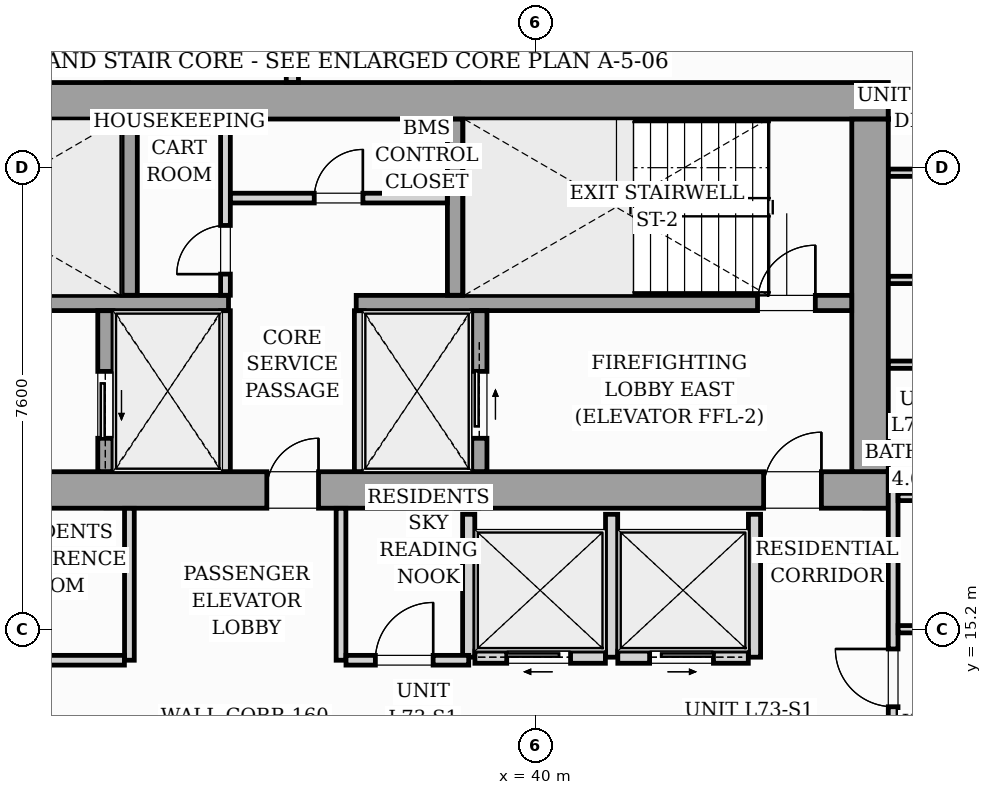
"""IFC4 building model, lengths in metres.
Left out: names, types, materials, properties, quantities, classifications, styles, units other than length and angle.
Written with IfcOpenShell. Run it as: python <this file> out.ifc"""

import sys

from ifc_helpers import new_model, si_unit, direction, frame, frame_2d, origin, origin_2d, place, context, subcontext, project, spatial, rectangle, i_section, extrude, source, transform, mapped, element, fill, save


model = new_model("IFC4")
c1 = context("Model", 3, precision=1e-05, world=origin(), true_north=direction((0.0, 1.0)))
c2 = subcontext(c1, "Body", "Model", "MODEL_VIEW")
j1 = project(units=[si_unit("LENGTHUNIT", "METRE"), si_unit("PLANEANGLEUNIT", "RADIAN")], contexts=[c1])
p1 = place(None, origin())
s1 = spatial("IfcSite", under=j1, at=p1, CompositionType="ELEMENT")
p2 = place(p1, origin())
s2 = spatial("IfcBuilding", under=s1, at=p2, CompositionType="ELEMENT")
p3 = place(p2, frame((0.0, 0.0, 252.9)))
s3 = spatial("IfcBuildingStorey", under=s2, at=p3, CompositionType="ELEMENT", Elevation=252.9)
m1 = source(origin(), c2, "Body", "SweptSolid", [
    extrude(i_section(OverallWidth=0.409, OverallDepth=0.425, WebThickness=0.033, FlangeThickness=0.052, FilletRadius=0.018, at=origin_2d()), origin(), (0.0, 0.0, 1.0), 3.296),
])
for number, where, z_axis, x_axis in (
    (1, (33.12, 17.4, 0.002), (0.0, 0.0, 1.0), (1.0, 0.0, 0.0)),
    (2, (38.88, 17.4, 0.002), (0.0, 0.0, 1.0), (1.0, 0.0, 0.0)),
    (3, (45.6, 17.4, 0.002), (0.0, 0.0, 1.0), (1.0, 0.0, 0.0)),
    (4, (33.12, 24.0, 0.002), (0.0, 0.0, 1.0), (1.0, 0.0, 0.0)),
    (5, (38.88, 24.0, 0.002), (0.0, 0.0, 1.0), (1.0, 0.0, 0.0)),
    (6, (45.6, 24.0, 0.002), (0.0, 0.0, 1.0), (1.0, 0.0, 0.0)),
):
    element("IfcColumn", number, at=place(p3, frame(where, z_axis=z_axis, x_axis=x_axis)), inside=s3, PredefinedType="PILASTER", context=c2, shape_type="MappedRepresentation", body=[
        mapped(m1, transform((0.0, 0.0, 0.0), scale=1.0)),
    ])
p4 = place(p3, frame((26.2, 17.5, 0.0), z_axis=(0.0, 0.0, 1.0), x_axis=(1.0, 0.0, 0.0)))
e7 = element("IfcWall", 7, at=p4, inside=s3, PredefinedType="SHEAR", context=c2, shape_type="SweptSolid", body=[
    extrude(rectangle(XDim=19.6, YDim=0.6, at=frame_2d((9.8, 0.0))), origin(), (0.0, 0.0, 1.0), 3.3),
])
p5 = place(p4, frame((0.95, 0.0, 0.0)))
e8 = element("IfcOpeningElement", 8, at=p5, cuts=e7, PredefinedType="OPENING", context=c2, shape_type="SweptSolid", body=[
    extrude(rectangle(XDim=0.95, YDim=2.06, at=frame_2d((0.475, 1.03))), frame((0.0, 0.31, 0.0), z_axis=(0.0, -1.0, 0.0), x_axis=(1.0, 0.0, 0.0)), (0.0, 0.0, 1.0), 0.62),
])
p6 = place(p4, frame((9.38, 0.0, 0.0)))
e9 = element("IfcOpeningElement", 9, at=p6, cuts=e7, PredefinedType="OPENING", context=c2, shape_type="SweptSolid", body=[
    extrude(rectangle(XDim=0.85, YDim=2.0, at=frame_2d((0.425, 1.0))), frame((0.0, 0.31, 0.0), z_axis=(0.0, -1.0, 0.0), x_axis=(1.0, 0.0, 0.0)), (0.0, 0.0, 1.0), 0.62),
])
p7 = place(p4, frame((17.55, 0.0, 0.0)))
e10 = element("IfcOpeningElement", 10, at=p7, cuts=e7, PredefinedType="OPENING", context=c2, shape_type="SweptSolid", body=[
    extrude(rectangle(XDim=0.95, YDim=2.06, at=frame_2d((0.475, 1.03))), frame((0.0, 0.31, 0.0), z_axis=(0.0, -1.0, 0.0), x_axis=(1.0, 0.0, 0.0)), (0.0, 0.0, 1.0), 0.62),
])
p8 = place(p3, frame((26.2, 23.9, 0.0), z_axis=(0.0, 0.0, 1.0), x_axis=(1.0, 0.0, 0.0)))
e11 = element("IfcWall", 11, at=p8, inside=s3, PredefinedType="SHEAR", context=c2, shape_type="SweptSolid", body=[
    extrude(rectangle(XDim=19.6, YDim=0.6, at=frame_2d((9.8, 0.0))), origin(), (0.0, 0.0, 1.0), 3.3),
])
p9 = place(p3, frame((45.5, 17.802, 0.0), z_axis=(0.0, 0.0, 1.0), x_axis=(0.0, 1.0, 0.0)))
e12 = element("IfcWall", 12, at=p9, inside=s3, PredefinedType="SHEAR", context=c2, shape_type="SweptSolid", body=[
    extrude(rectangle(XDim=5.796, YDim=0.6, at=frame_2d((2.898, 0.0))), origin(), (0.0, 0.0, 1.0), 3.3),
])
p10 = place(p3, frame((26.802, 20.575, 0.0), z_axis=(0.0, 0.0, 1.0), x_axis=(1.0, 0.0, 0.0)))
e13 = element("IfcWall", 13, at=p10, inside=s3, PredefinedType="SOLIDWALL", context=c2, shape_type="SweptSolid", body=[
    extrude(rectangle(XDim=8.148, YDim=0.25, at=frame_2d((4.074, 0.0))), origin(), (0.0, 0.0, 1.0), 3.3),
])
p11 = place(p10, frame((0.298, 0.0, 0.0)))
e14 = element("IfcOpeningElement", 14, at=p11, cuts=e13, PredefinedType="OPENING", context=c2, shape_type="SweptSolid", body=[
    extrude(rectangle(XDim=0.95, YDim=2.06, at=frame_2d((0.475, 1.03))), frame((0.0, 0.135, 0.0), z_axis=(0.0, -1.0, 0.0), x_axis=(1.0, 0.0, 0.0)), (0.0, 0.0, 1.0), 0.27),
])
p12 = place(p3, frame((37.05, 20.575, 0.0), z_axis=(0.0, 0.0, 1.0), x_axis=(1.0, 0.0, 0.0)))
e15 = element("IfcWall", 15, at=p12, inside=s3, PredefinedType="SOLIDWALL", context=c2, shape_type="SweptSolid", body=[
    extrude(rectangle(XDim=8.148, YDim=0.25, at=frame_2d((4.074, 0.0))), origin(), (0.0, 0.0, 1.0), 3.3),
])
p13 = place(p12, frame((6.6, 0.0, 0.0)))
e16 = element("IfcOpeningElement", 16, at=p13, cuts=e15, PredefinedType="OPENING", context=c2, shape_type="SweptSolid", body=[
    extrude(rectangle(XDim=0.95, YDim=2.06, at=frame_2d((0.475, 1.03))), frame((0.0, 0.135, 0.0), z_axis=(0.0, -1.0, 0.0), x_axis=(1.0, 0.0, 0.0)), (0.0, 0.0, 1.0), 0.27),
])
for number, where, z_axis, x_axis in (
    (17, (33.325, 20.702, 0.0), (0.0, 0.0, 1.0), (0.0, 1.0, 0.0)),
    (18, (38.675, 20.702, 0.0), (0.0, 0.0, 1.0), (0.0, 1.0, 0.0)),
):
    element("IfcWall", number, at=place(p3, frame(where, z_axis=z_axis, x_axis=x_axis)), inside=s3, PredefinedType="SOLIDWALL", context=c2, shape_type="SweptSolid", body=[
        extrude(rectangle(XDim=2.896, YDim=0.25, at=frame_2d((1.448, 0.0))), origin(), (0.0, 0.0, 1.0), 3.3),
    ])
p14 = place(p3, frame((32.925, 17.802, 0.0), z_axis=(0.0, 0.0, 1.0), x_axis=(0.0, 1.0, 0.0)))
e19 = element("IfcWall", 19, at=p14, inside=s3, PredefinedType="SOLIDWALL", context=c2, shape_type="SweptSolid", body=[
    extrude(rectangle(XDim=2.646, YDim=0.25, at=frame_2d((1.323, 0.0))), origin(), (0.0, 0.0, 1.0), 3.3),
])
p15 = place(p14, frame((0.548, 0.0, 0.0)))
e20 = element("IfcOpeningElement", 20, at=p15, cuts=e19, PredefinedType="OPENING", context=c2, shape_type="SweptSolid", body=[
    extrude(rectangle(XDim=1.1, YDim=2.08, at=frame_2d((0.55, 1.04))), frame((0.0, 0.135, 0.0), z_axis=(0.0, -1.0, 0.0), x_axis=(1.0, 0.0, 0.0)), (0.0, 0.0, 1.0), 0.27),
])
for number, where, z_axis, x_axis in (
    (21, (34.9, 17.802, 0.0), (0.0, 0.0, 1.0), (0.0, 1.0, 0.0)),
    (22, (37.1, 17.802, 0.0), (0.0, 0.0, 1.0), (0.0, 1.0, 0.0)),
):
    element("IfcWall", number, at=place(p3, frame(where, z_axis=z_axis, x_axis=x_axis)), inside=s3, PredefinedType="PARTITIONING", context=c2, shape_type="SweptSolid", body=[
        extrude(rectangle(XDim=2.646, YDim=0.16, at=frame_2d((1.323, 0.0))), origin(), (0.0, 0.0, 1.0), 3.04),
    ])
p16 = place(p3, frame((39.075, 17.802, 0.0), z_axis=(0.0, 0.0, 1.0), x_axis=(0.0, 1.0, 0.0)))
e23 = element("IfcWall", 23, at=p16, inside=s3, PredefinedType="SOLIDWALL", context=c2, shape_type="SweptSolid", body=[
    extrude(rectangle(XDim=2.646, YDim=0.25, at=frame_2d((1.323, 0.0))), origin(), (0.0, 0.0, 1.0), 3.3),
])
p17 = place(p16, frame((0.548, 0.0, 0.0)))
e24 = element("IfcOpeningElement", 24, at=p17, cuts=e23, PredefinedType="OPENING", context=c2, shape_type="SweptSolid", body=[
    extrude(rectangle(XDim=1.1, YDim=2.08, at=frame_2d((0.55, 1.04))), frame((0.0, 0.135, 0.0), z_axis=(0.0, -1.0, 0.0), x_axis=(1.0, 0.0, 0.0)), (0.0, 0.0, 1.0), 0.27),
])
p18 = place(p3, frame((34.9, 20.702, 0.0), z_axis=(0.0, 0.0, 1.0), x_axis=(0.0, 1.0, 0.0)))
e25 = element("IfcWall", 25, at=p18, inside=s3, PredefinedType="PARTITIONING", context=c2, shape_type="SweptSolid", body=[
    extrude(rectangle(XDim=2.896, YDim=0.16, at=frame_2d((1.448, 0.0))), origin(), (0.0, 0.0, 1.0), 3.04),
])
p19 = place(p18, frame((0.348, 0.0, 0.0)))
e26 = element("IfcOpeningElement", 26, at=p19, cuts=e25, PredefinedType="OPENING", context=c2, shape_type="SweptSolid", body=[
    extrude(rectangle(XDim=0.8, YDim=2.05, at=frame_2d((0.4, 1.025))), frame((0.0, 0.09, 0.0), z_axis=(0.0, -1.0, 0.0), x_axis=(1.0, 0.0, 0.0)), (0.0, 0.0, 1.0), 0.18),
])
p20 = place(p3, frame((34.982, 22.3, 0.0), z_axis=(0.0, 0.0, 1.0), x_axis=(1.0, 0.0, 0.0)))
e27 = element("IfcWall", 27, at=p20, inside=s3, PredefinedType="PARTITIONING", context=c2, shape_type="SweptSolid", body=[
    extrude(rectangle(XDim=3.566, YDim=0.16, at=frame_2d((1.783, 0.0))), origin(), (0.0, 0.0, 1.0), 3.04),
])
p21 = place(p20, frame((1.378, 0.0, 0.0)))
e28 = element("IfcOpeningElement", 28, at=p21, cuts=e27, PredefinedType="OPENING", context=c2, shape_type="SweptSolid", body=[
    extrude(rectangle(XDim=0.8, YDim=2.05, at=frame_2d((0.4, 1.025))), frame((0.0, 0.09, 0.0), z_axis=(0.0, -1.0, 0.0), x_axis=(1.0, 0.0, 0.0)), (0.0, 0.0, 1.0), 0.18),
])
for number, where, z_axis, x_axis in (
    (29, (38.9, 14.75, 0.0), (0.0, 0.0, 1.0), (0.0, 1.0, 0.0)),
    (30, (41.25, 14.75, 0.0), (0.0, 0.0, 1.0), (0.0, 1.0, 0.0)),
    (31, (43.6, 14.75, 0.0), (0.0, 0.0, 1.0), (0.0, 1.0, 0.0)),
):
    element("IfcWall", number, at=place(p3, frame(where, z_axis=z_axis, x_axis=x_axis)), inside=s3, PredefinedType="PARTITIONING", context=c2, shape_type="SweptSolid", body=[
        extrude(rectangle(XDim=2.35, YDim=0.2, at=frame_2d((1.175, 0.0))), origin(), (0.0, 0.0, 1.0), 3.04),
    ])
p22 = place(p3, frame((39.002, 14.75, 0.0), z_axis=(0.0, 0.0, 1.0), x_axis=(1.0, 0.0, 0.0)))
e32 = element("IfcWall", 32, at=p22, inside=s3, PredefinedType="PARTITIONING", context=c2, shape_type="SweptSolid", body=[
    extrude(rectangle(XDim=2.146, YDim=0.2, at=frame_2d((1.073, 0.0))), origin(), (0.0, 0.0, 1.0), 3.04),
])
p23 = place(p22, frame((0.523, 0.0, 0.0)))
e33 = element("IfcOpeningElement", 33, at=p23, cuts=e32, PredefinedType="OPENING", context=c2, shape_type="SweptSolid", body=[
    extrude(rectangle(XDim=1.05, YDim=2.08, at=frame_2d((0.525, 1.04))), frame((0.0, 0.11, 0.0), z_axis=(0.0, -1.0, 0.0), x_axis=(1.0, 0.0, 0.0)), (0.0, 0.0, 1.0), 0.22),
])
p24 = place(p3, frame((41.352, 14.75, 0.0), z_axis=(0.0, 0.0, 1.0), x_axis=(1.0, 0.0, 0.0)))
e34 = element("IfcWall", 34, at=p24, inside=s3, PredefinedType="PARTITIONING", context=c2, shape_type="SweptSolid", body=[
    extrude(rectangle(XDim=2.146, YDim=0.2, at=frame_2d((1.073, 0.0))), origin(), (0.0, 0.0, 1.0), 3.04),
])
p25 = place(p24, frame((0.523, 0.0, 0.0)))
e35 = element("IfcOpeningElement", 35, at=p25, cuts=e34, PredefinedType="OPENING", context=c2, shape_type="SweptSolid", body=[
    extrude(rectangle(XDim=1.05, YDim=2.08, at=frame_2d((0.525, 1.04))), frame((0.0, 0.11, 0.0), z_axis=(0.0, -1.0, 0.0), x_axis=(1.0, 0.0, 0.0)), (0.0, 0.0, 1.0), 0.22),
])
p26 = place(p3, frame((45.88, 13.442, 0.0), z_axis=(0.0, 0.0, 1.0), x_axis=(0.0, 1.0, 0.0)))
e36 = element("IfcWall", 36, at=p26, inside=s3, PredefinedType="PARTITIONING", context=c2, shape_type="SweptSolid", body=[
    extrude(rectangle(XDim=4.36, YDim=0.16, at=frame_2d((2.18, 0.0))), origin(), (0.0, 0.0, 1.0), 3.04),
])
p27 = place(p26, frame((0.493, 0.0, 0.0)))
e37 = element("IfcOpeningElement", 37, at=p27, cuts=e36, PredefinedType="OPENING", context=c2, shape_type="SweptSolid", body=[
    extrude(rectangle(XDim=0.95, YDim=2.06, at=frame_2d((0.475, 1.03))), frame((0.0, 0.09, 0.0), z_axis=(0.0, -1.0, 0.0), x_axis=(1.0, 0.0, 0.0)), (0.0, 0.0, 1.0), 0.18),
])
p28 = place(p3, frame((45.88, 23.598, 0.0), z_axis=(0.0, 0.0, 1.0), x_axis=(0.0, 1.0, 0.0)))
e38 = element("IfcWall", 38, at=p28, inside=s3, PredefinedType="PARTITIONING", context=c2, shape_type="SweptSolid", body=[
    extrude(rectangle(XDim=0.452, YDim=0.16, at=frame_2d((0.226, 0.0))), origin(), (0.0, 0.0, 1.0), 3.04),
])
p29 = place(p3, frame((36.0, 24.202, 0.0), z_axis=(0.0, 0.0, 1.0), x_axis=(0.0, 1.0, 0.0)))
e39 = element("IfcWall", 39, at=p29, inside=s3, PredefinedType="PARTITIONING", context=c2, shape_type="SweptSolid", body=[
    extrude(rectangle(XDim=2.363, YDim=0.2, at=frame_2d((1.182, 0.0))), origin(), (0.0, 0.0, 1.0), 3.04),
])
p30 = place(p3, frame((45.962, 17.385, 0.0), z_axis=(0.0, 0.0, 1.0), x_axis=(1.0, 0.0, 0.0)))
e40 = element("IfcWall", 40, at=p30, inside=s3, PredefinedType="PARTITIONING", context=c2, shape_type="SweptSolid", body=[
    extrude(rectangle(XDim=2.256, YDim=0.12, at=frame_2d((1.128, 0.0))), origin(), (0.0, 0.0, 1.0), 2.382),
])
p31 = place(p3, frame((45.962, 15.21, 0.0), z_axis=(0.0, 0.0, 1.0), x_axis=(1.0, 0.0, 0.0)))
e41 = element("IfcWall", 41, at=p31, inside=s3, PredefinedType="PARTITIONING", context=c2, shape_type="SweptSolid", body=[
    extrude(rectangle(XDim=2.256, YDim=0.12, at=frame_2d((1.128, 0.0))), origin(), (0.0, 0.0, 1.0), 3.04),
])
p32 = place(p3, frame((45.802, 19.56, 0.0), z_axis=(0.0, 0.0, 1.0), x_axis=(1.0, 0.0, 0.0)))
e42 = element("IfcWall", 42, at=p32, inside=s3, PredefinedType="PARTITIONING", context=c2, shape_type="SweptSolid", body=[
    extrude(rectangle(XDim=2.416, YDim=0.12, at=frame_2d((1.208, 0.0))), origin(), (0.0, 0.0, 1.0), 3.04),
])
p33 = place(p3, frame((45.802, 22.717, 0.0), z_axis=(0.0, 0.0, 1.0), x_axis=(1.0, 0.0, 0.0)))
e43 = element("IfcWall", 43, at=p33, inside=s3, PredefinedType="PARTITIONING", context=c2, shape_type="SweptSolid", body=[
    extrude(rectangle(XDim=9.406, YDim=0.12, at=frame_2d((4.703, 0.0))), origin(), (0.0, 0.0, 1.0), 3.04),
])
p34 = place(p33, frame((4.397, 0.0, 0.0)))
e44 = element("IfcOpeningElement", 44, at=p34, cuts=e43, PredefinedType="OPENING", context=c2, shape_type="SweptSolid", body=[
    extrude(rectangle(XDim=0.85, YDim=2.05, at=frame_2d((0.425, 1.025))), frame((0.0, 0.07, 0.0), z_axis=(0.0, -1.0, 0.0), x_axis=(1.0, 0.0, 0.0)), (0.0, 0.0, 1.0), 0.14),
])
p35 = place(p3, frame((45.802, 20.954, 0.0), z_axis=(0.0, 0.0, 1.0), x_axis=(1.0, 0.0, 0.0)))
e45 = element("IfcWall", 45, at=p35, inside=s3, PredefinedType="PARTITIONING", context=c2, shape_type="SweptSolid", body=[
    extrude(rectangle(XDim=10.683, YDim=0.12, at=frame_2d((5.342, 0.0))), origin(), (0.0, 0.0, 1.0), 3.04),
])
p36 = place(p35, frame((5.062, 0.0, 0.0)))
e46 = element("IfcOpeningElement", 46, at=p36, cuts=e45, PredefinedType="OPENING", context=c2, shape_type="SweptSolid", body=[
    extrude(rectangle(XDim=0.85, YDim=2.05, at=frame_2d((0.425, 1.025))), frame((0.0, 0.07, 0.0), z_axis=(0.0, -1.0, 0.0), x_axis=(1.0, 0.0, 0.0)), (0.0, 0.0, 1.0), 0.14),
])
p37 = place(p3, frame((33.32, 14.7, 0.0), z_axis=(0.0, 0.0, 1.0), x_axis=(0.0, 1.0, 0.0)))
e47 = element("IfcWall", 47, at=p37, inside=s3, PredefinedType="PARTITIONING", context=c2, shape_type="SweptSolid", body=[
    extrude(rectangle(XDim=2.498, YDim=0.16, at=frame_2d((1.249, 0.0))), origin(), (0.0, 0.0, 1.0), 3.04),
])
p38 = place(p3, frame((28.442, 14.7, 0.0), z_axis=(0.0, 0.0, 1.0), x_axis=(1.0, 0.0, 0.0)))
e48 = element("IfcWall", 48, at=p38, inside=s3, PredefinedType="PARTITIONING", context=c2, shape_type="SweptSolid", body=[
    extrude(rectangle(XDim=4.796, YDim=0.16, at=frame_2d((2.398, 0.0))), origin(), (0.0, 0.0, 1.0), 2.605),
])
p39 = place(p38, frame((1.923, 0.0, 0.0)))
e49 = element("IfcOpeningElement", 49, at=p39, cuts=e48, PredefinedType="OPENING", context=c2, shape_type="SweptSolid", body=[
    extrude(rectangle(XDim=0.95, YDim=2.06, at=frame_2d((0.475, 1.03))), frame((0.0, 0.09, 0.0), z_axis=(0.0, -1.0, 0.0), x_axis=(1.0, 0.0, 0.0)), (0.0, 0.0, 1.0), 0.18),
])
p40 = place(p3, frame((36.8, 14.7, 0.0), z_axis=(0.0, 0.0, 1.0), x_axis=(0.0, 1.0, 0.0)))
e50 = element("IfcWall", 50, at=p40, inside=s3, PredefinedType="PARTITIONING", context=c2, shape_type="SweptSolid", body=[
    extrude(rectangle(XDim=2.498, YDim=0.16, at=frame_2d((1.249, 0.0))), origin(), (0.0, 0.0, 1.0), 3.04),
])
p41 = place(p3, frame((36.882, 14.7, 0.0), z_axis=(0.0, 0.0, 1.0), x_axis=(1.0, 0.0, 0.0)))
e51 = element("IfcWall", 51, at=p41, inside=s3, PredefinedType="PARTITIONING", context=c2, shape_type="SweptSolid", body=[
    extrude(rectangle(XDim=2.018, YDim=0.16, at=frame_2d((1.009, 0.0))), origin(), (0.0, 0.0, 1.0), 3.04),
])
p42 = place(p41, frame((0.483, 0.0, 0.0)))
e52 = element("IfcOpeningElement", 52, at=p42, cuts=e51, PredefinedType="OPENING", context=c2, shape_type="SweptSolid", body=[
    extrude(rectangle(XDim=0.95, YDim=2.06, at=frame_2d((0.475, 1.03))), frame((0.0, 0.09, 0.0), z_axis=(0.0, -1.0, 0.0), x_axis=(1.0, 0.0, 0.0)), (0.0, 0.0, 1.0), 0.18),
])
m2 = source(origin(), c2, "Body", "SweptSolid", [
    extrude(rectangle(XDim=0.85, YDim=2.0, at=frame_2d((0.425, 1.0))), frame((0.0, 0.025, 0.0), z_axis=(0.0, -1.0, 0.0), x_axis=(1.0, 0.0, 0.0)), (0.0, 0.0, 1.0), 0.05),
])
p43 = place(p6, origin())
e53 = element("IfcDoor", 53, at=p43, inside=s3, OperationType="SINGLE_SWING_RIGHT", PredefinedType="DOOR", context=c2, shape_type="MappedRepresentation", body=[
    mapped(m2, transform((0.0, 0.0, 0.0), scale=1.0)),
])
fill(e9, e53)
m3 = source(origin(), c2, "Body", "SweptSolid", [
    extrude(rectangle(XDim=0.95, YDim=2.06, at=frame_2d((0.475, 1.03))), frame((0.0, 0.025, 0.0), z_axis=(0.0, -1.0, 0.0), x_axis=(1.0, 0.0, 0.0)), (0.0, 0.0, 1.0), 0.05),
])
p44 = place(p7, origin())
e54 = element("IfcDoor", 54, at=p44, inside=s3, OperationType="SINGLE_SWING_RIGHT", PredefinedType="DOOR", context=c2, shape_type="MappedRepresentation", body=[
    mapped(m3, transform((0.0, 0.0, 0.0), scale=1.0)),
])
fill(e10, e54)
p45 = place(p13, origin())
e55 = element("IfcDoor", 55, at=p45, inside=s3, OperationType="SINGLE_SWING_RIGHT", PredefinedType="DOOR", context=c2, shape_type="MappedRepresentation", body=[
    mapped(m3, transform((0.0, 0.0, 0.0), scale=1.0)),
])
fill(e16, e55)
m4 = source(origin(), c2, "Body", "SweptSolid", [
    extrude(rectangle(XDim=1.1, YDim=2.08, at=frame_2d((0.55, 1.04))), frame((0.0, 0.025, 0.0), z_axis=(0.0, -1.0, 0.0), x_axis=(1.0, 0.0, 0.0)), (0.0, 0.0, 1.0), 0.05),
])
p46 = place(p15, origin())
e56 = element("IfcDoor", 56, at=p46, inside=s3, OperationType="SLIDING_TO_LEFT", PredefinedType="DOOR", context=c2, shape_type="MappedRepresentation", body=[
    mapped(m4, transform((0.0, 0.0, 0.0), scale=1.0)),
])
fill(e20, e56)
p47 = place(p17, origin())
e57 = element("IfcDoor", 57, at=p47, inside=s3, OperationType="SLIDING_TO_RIGHT", PredefinedType="DOOR", context=c2, shape_type="MappedRepresentation", body=[
    mapped(m4, transform((0.0, 0.0, 0.0), scale=1.0)),
])
fill(e24, e57)
m5 = source(origin(), c2, "Body", "SweptSolid", [
    extrude(rectangle(XDim=0.8, YDim=2.05, at=frame_2d((0.4, 1.025))), frame((0.0, 0.025, 0.0), z_axis=(0.0, -1.0, 0.0), x_axis=(1.0, 0.0, 0.0)), (0.0, 0.0, 1.0), 0.05),
])
p48 = place(p19, origin())
e58 = element("IfcDoor", 58, at=p48, inside=s3, OperationType="SINGLE_SWING_LEFT", PredefinedType="DOOR", context=c2, shape_type="MappedRepresentation", body=[
    mapped(m5, transform((0.0, 0.0, 0.0), scale=1.0)),
])
fill(e26, e58)
p49 = place(p21, origin())
e59 = element("IfcDoor", 59, at=p49, inside=s3, OperationType="SINGLE_SWING_RIGHT", PredefinedType="DOOR", context=c2, shape_type="MappedRepresentation", body=[
    mapped(m5, transform((0.0, 0.0, 0.0), scale=1.0)),
])
fill(e28, e59)
m6 = source(origin(), c2, "Body", "SweptSolid", [
    extrude(rectangle(XDim=1.05, YDim=2.08, at=frame_2d((0.525, 1.04))), frame((0.0, 0.025, 0.0), z_axis=(0.0, -1.0, 0.0), x_axis=(1.0, 0.0, 0.0)), (0.0, 0.0, 1.0), 0.05),
])
p50 = place(p23, origin())
e60 = element("IfcDoor", 60, at=p50, inside=s3, OperationType="SLIDING_TO_LEFT", PredefinedType="DOOR", context=c2, shape_type="MappedRepresentation", body=[
    mapped(m6, transform((0.0, 0.0, 0.0), scale=1.0)),
])
fill(e33, e60)
p51 = place(p25, origin())
e61 = element("IfcDoor", 61, at=p51, inside=s3, OperationType="SLIDING_TO_RIGHT", PredefinedType="DOOR", context=c2, shape_type="MappedRepresentation", body=[
    mapped(m6, transform((0.0, 0.0, 0.0), scale=1.0)),
])
fill(e35, e61)
m7 = source(origin(), c2, "Body", "SweptSolid", [
    extrude(rectangle(XDim=0.95, YDim=2.06, at=frame_2d((0.475, 1.03))), frame((0.0, 0.025, 0.0), z_axis=(0.0, -1.0, 0.0), x_axis=(1.0, 0.0, 0.0)), (0.0, 0.0, 1.0), 0.05),
])
p52 = place(p27, origin())
e62 = element("IfcDoor", 62, at=p52, inside=s3, OperationType="SINGLE_SWING_RIGHT", PredefinedType="DOOR", context=c2, shape_type="MappedRepresentation", body=[
    mapped(m7, transform((0.0, 0.0, 0.0), scale=1.0)),
])
fill(e37, e62)
p53 = place(p42, origin())
e63 = element("IfcDoor", 63, at=p53, inside=s3, OperationType="SINGLE_SWING_RIGHT", PredefinedType="DOOR", context=c2, shape_type="MappedRepresentation", body=[
    mapped(m7, transform((0.0, 0.0, 0.0), scale=1.0)),
])
fill(e52, e63)
save(model, sys.argv[1])
